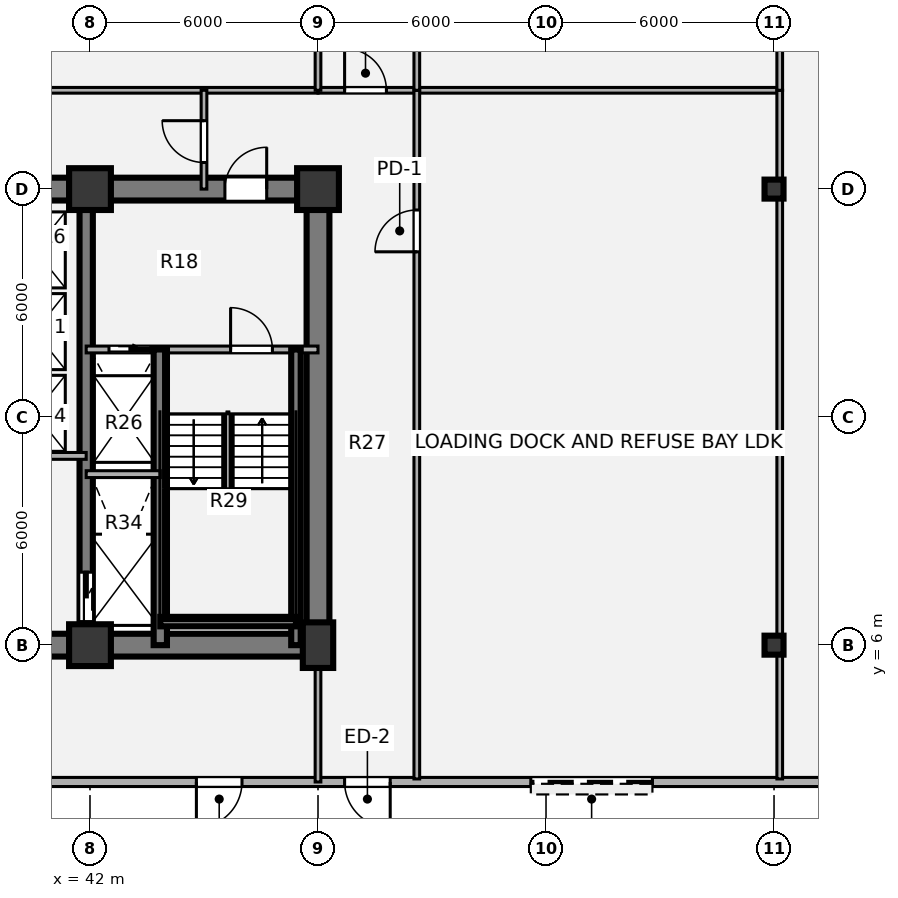
"""IFC4 building model, lengths in metres.
Left out: names, types, materials, properties, quantities, classifications, styles, units other than length and angle.
Written with IfcOpenShell. Run it as: python <this file> out.ifc"""

import sys

from ifc_helpers import new_model, si_unit, direction, frame, frame_2d, origin, origin_2d, place, context, subcontext, project, spatial, rectangle, i_section, extrude, source, transform, mapped, element, fill, save


model = new_model("IFC4")
c1 = context("Model", 3, precision=1e-05, world=origin(), true_north=direction((0.0, 1.0)))
c2 = subcontext(c1, "Body", "Model", "MODEL_VIEW")
j1 = project(units=[si_unit("LENGTHUNIT", "METRE"), si_unit("PLANEANGLEUNIT", "RADIAN")], contexts=[c1])
p1 = place(None, origin())
s1 = spatial("IfcSite", under=j1, at=p1, CompositionType="ELEMENT")
p2 = place(p1, origin())
s2 = spatial("IfcBuilding", under=s1, at=p2, CompositionType="ELEMENT")
p3 = place(p2, origin())
s3 = spatial("IfcBuildingStorey", under=s2, at=p3, CompositionType="ELEMENT", Elevation=0.0)
m1 = source(origin(), c2, "Body", "SweptSolid", [
    extrude(rectangle(XDim=1.1, YDim=1.1, at=origin_2d()), origin(), (0.0, 0.0, 1.0), 5.4),
])
p4 = place(p3, frame((42.0, 6.0, 0.0), z_axis=(0.0, 0.0, 1.0), x_axis=(1.0, 0.0, 0.0)))
e1 = element("IfcColumn", 1, at=p4, inside=s3, PredefinedType="COLUMN", context=c2, shape_type="MappedRepresentation", body=[
    mapped(m1, transform((0.0, 0.0, 0.0), x_axis=(1.0, 0.0, 0.0), y_axis=(0.0, 1.0, 0.0), z_axis=(0.0, 0.0, 1.0), scale=1.0)),
])
m2 = source(origin(), c2, "Body", "SweptSolid", [
    extrude(rectangle(XDim=0.8, YDim=1.2, at=origin_2d()), origin(), (0.0, 0.0, 1.0), 5.4),
])
p5 = place(p3, frame((48.0, 6.0, 0.0), z_axis=(0.0, 0.0, 1.0), x_axis=(1.0, 0.0, 0.0)))
e2 = element("IfcColumn", 2, at=p5, inside=s3, PredefinedType="COLUMN", context=c2, shape_type="MappedRepresentation", body=[
    mapped(m2, transform((0.0, 0.0, 0.0), x_axis=(1.0, 0.0, 0.0), y_axis=(0.0, 1.0, 0.0), z_axis=(0.0, 0.0, 1.0), scale=1.0)),
])
for number, where, z_axis, x_axis in (
    (3, (42.0, 18.0, 0.0), (0.0, 0.0, 1.0), (1.0, 0.0, 0.0)),
    (4, (48.0, 18.0, 0.0), (0.0, 0.0, 1.0), (1.0, 0.0, 0.0)),
):
    element("IfcColumn", number, at=place(p3, frame(where, z_axis=z_axis, x_axis=x_axis)), inside=s3, PredefinedType="COLUMN", context=c2, shape_type="MappedRepresentation", body=[
        mapped(m1, transform((0.0, 0.0, 0.0), x_axis=(1.0, 0.0, 0.0), y_axis=(0.0, 1.0, 0.0), z_axis=(0.0, 0.0, 1.0), scale=1.0)),
    ])
p6 = place(p3, frame((48.3, 6.0, 0.0), z_axis=(0.0, 0.0, 1.0), x_axis=(-1.0, 0.0, 0.0)))
e5 = element("IfcWall", 5, at=p6, inside=s3, PredefinedType="SHEAR", context=c2, shape_type="SweptSolid", body=[
    extrude(rectangle(XDim=24.6, YDim=0.6, at=frame_2d((12.3, 0.0))), origin(), (0.0, 0.0, 1.0), 5.4),
])
p7 = place(p3, frame((48.0, 18.0, 0.0), z_axis=(0.0, 0.0, 1.0), x_axis=(0.0, -1.0, 0.0)))
e6 = element("IfcWall", 6, at=p7, inside=s3, PredefinedType="SHEAR", context=c2, shape_type="SweptSolid", body=[
    extrude(rectangle(XDim=12.0, YDim=0.6, at=frame_2d((6.0, 0.0))), origin(), (0.0, 0.0, 1.0), 5.4),
])
p8 = place(p3, frame((38.8, 18.0, 0.0), z_axis=(0.0, 0.0, 1.0), x_axis=(1.0, 0.0, 0.0)))
e7 = element("IfcWall", 7, at=p8, inside=s3, PredefinedType="SHEAR", context=c2, shape_type="SweptSolid", body=[
    extrude(rectangle(XDim=9.5, YDim=0.6, at=frame_2d((4.75, 0.0))), origin(), (0.0, 0.0, 1.0), 5.4),
])
p9 = place(p8, frame((6.75, 0.0, 0.0)))
e8 = element("IfcOpeningElement", 8, at=p9, cuts=e7, PredefinedType="OPENING", context=c2, shape_type="SweptSolid", body=[
    extrude(rectangle(XDim=1.1, YDim=2.1, at=origin_2d()), frame((0.55, 0.31, 1.05), z_axis=(0.0, -1.0, 0.0), x_axis=(1.0, 0.0, 0.0)), (0.0, 0.0, 1.0), 0.62),
])
p10 = place(p3, frame((41.9, 18.0, 0.0), z_axis=(0.0, 0.0, 1.0), x_axis=(0.0, -1.0, 0.0)))
e9 = element("IfcWall", 9, at=p10, inside=s3, PredefinedType="SHEAR", context=c2, shape_type="SweptSolid", body=[
    extrude(rectangle(XDim=12.0, YDim=0.35, at=frame_2d((6.0, 0.0))), origin(), (0.0, 0.0, 1.0), 5.4),
])
p11 = place(p10, frame((10.08, 0.0, 0.0)))
e10 = element("IfcOpeningElement", 10, at=p11, cuts=e9, PredefinedType="OPENING", context=c2, shape_type="SweptSolid", body=[
    extrude(rectangle(XDim=1.3, YDim=2.1, at=origin_2d()), frame((0.65, 0.185, 1.05), z_axis=(0.0, -1.0, 0.0), x_axis=(1.0, 0.0, 0.0)), (0.0, 0.0, 1.0), 0.37),
])
m3 = source(origin(), c2, "Body", "SweptSolid", [
    extrude(i_section(OverallWidth=0.5, OverallDepth=0.5, WebThickness=0.028, FlangeThickness=0.045, at=origin_2d()), origin(), (0.0, 0.0, 1.0), 5.4),
])
for number, where, z_axis, x_axis in (
    (11, (60.0, 6.0, 0.0), (0.0, 0.0, 1.0), (1.0, 0.0, 0.0)),
    (12, (60.0, 18.0, 0.0), (0.0, 0.0, 1.0), (1.0, 0.0, 0.0)),
):
    element("IfcColumn", number, at=place(p3, frame(where, z_axis=z_axis, x_axis=x_axis)), inside=s3, PredefinedType="COLUMN", context=c2, shape_type="MappedRepresentation", body=[
        mapped(m3, transform((0.0, 0.0, 0.0), x_axis=(1.0, 0.0, 0.0), y_axis=(0.0, 1.0, 0.0), z_axis=(0.0, 0.0, 1.0), scale=1.0)),
    ])
p12 = place(p3, frame((61.8, 2.4, 0.0), z_axis=(0.0, 0.0, 1.0), x_axis=(-1.0, 0.0, 0.0)))
e13 = element("IfcWall", 13, at=p12, inside=s3, PredefinedType="SOLIDWALL", context=c2, shape_type="SweptSolid", body=[
    extrude(rectangle(XDim=51.6, YDim=0.24, at=frame_2d((25.8, 0.0))), origin(), (0.0, 0.0, 1.0), 5.12),
])
p13 = place(p12, frame((5.0, 0.0, 0.0)))
e14 = element("IfcOpeningElement", 14, at=p13, cuts=e13, PredefinedType="OPENING", context=c2, shape_type="SweptSolid", body=[
    extrude(rectangle(XDim=3.2, YDim=3.4, at=origin_2d()), frame((1.6, 0.13, 1.7), z_axis=(0.0, -1.0, 0.0), x_axis=(1.0, 0.0, 0.0)), (0.0, 0.0, 1.0), 0.26),
])
p14 = place(p12, frame((11.9, 0.0, 0.0)))
e15 = element("IfcOpeningElement", 15, at=p14, cuts=e13, PredefinedType="OPENING", context=c2, shape_type="SweptSolid", body=[
    extrude(rectangle(XDim=1.2, YDim=2.2, at=origin_2d()), frame((0.6, 0.13, 1.1), z_axis=(0.0, -1.0, 0.0), x_axis=(1.0, 0.0, 0.0)), (0.0, 0.0, 1.0), 0.26),
])
p15 = place(p12, frame((15.8, 0.0, 0.0)))
e16 = element("IfcOpeningElement", 16, at=p15, cuts=e13, PredefinedType="OPENING", context=c2, shape_type="SweptSolid", body=[
    extrude(rectangle(XDim=1.2, YDim=2.2, at=origin_2d()), frame((0.6, 0.13, 1.1), z_axis=(0.0, -1.0, 0.0), x_axis=(1.0, 0.0, 0.0)), (0.0, 0.0, 1.0), 0.26),
])
p16 = place(p12, frame((24.9, 0.0, 0.0)))
e17 = element("IfcOpeningElement", 17, at=p16, cuts=e13, PredefinedType="OPENING", context=c2, shape_type="SweptSolid", body=[
    extrude(rectangle(XDim=1.8, YDim=2.3, at=origin_2d()), frame((0.9, 0.13, 1.15), z_axis=(0.0, -1.0, 0.0), x_axis=(1.0, 0.0, 0.0)), (0.0, 0.0, 1.0), 0.26),
])
p17 = place(p12, frame((39.8, 0.0, 0.0)))
e18 = element("IfcOpeningElement", 18, at=p17, cuts=e13, PredefinedType="OPENING", context=c2, shape_type="SweptSolid", body=[
    extrude(rectangle(XDim=1.2, YDim=2.2, at=origin_2d()), frame((0.6, 0.13, 1.1), z_axis=(0.0, -1.0, 0.0), x_axis=(1.0, 0.0, 0.0)), (0.0, 0.0, 1.0), 0.26),
])
p18 = place(p12, frame((42.8, 0.0, 0.0)))
e19 = element("IfcOpeningElement", 19, at=p18, cuts=e13, PredefinedType="OPENING", context=c2, shape_type="SweptSolid", body=[
    extrude(rectangle(XDim=6.0, YDim=3.6, at=origin_2d()), frame((3.0, 0.13, 1.8), z_axis=(0.0, -1.0, 0.0), x_axis=(1.0, 0.0, 0.0)), (0.0, 0.0, 1.0), 0.26),
])
p19 = place(p12, frame((28.4, 0.0, 1.1)))
e20 = element("IfcOpeningElement", 20, at=p19, cuts=e13, PredefinedType="OPENING", context=c2, shape_type="SweptSolid", body=[
    extrude(rectangle(XDim=1.8, YDim=1.5, at=origin_2d()), frame((0.9, 0.13, 0.75), z_axis=(0.0, -1.0, 0.0), x_axis=(1.0, 0.0, 0.0)), (0.0, 0.0, 1.0), 0.26),
])
p20 = place(p3, frame((39.35, 10.98, 0.0), z_axis=(0.0, 0.0, 1.0), x_axis=(1.0, 0.0, 0.0)))
e21 = element("IfcWall", 21, at=p20, inside=s3, PredefinedType="PARTITIONING", context=c2, shape_type="SweptSolid", body=[
    extrude(rectangle(XDim=2.55, YDim=0.18, at=frame_2d((1.275, 0.0))), origin(), (0.0, 0.0, 1.0), 5.09),
])
p21 = place(p3, frame((41.9, 13.78, 0.0), z_axis=(0.0, 0.0, 1.0), x_axis=(1.0, 0.0, 0.0)))
e22 = element("IfcWall", 22, at=p21, inside=s3, PredefinedType="PARTITIONING", context=c2, shape_type="SweptSolid", body=[
    extrude(rectangle(XDim=6.1, YDim=0.18, at=frame_2d((3.05, 0.0))), origin(), (0.0, 0.0, 1.0), 2.229),
])
p22 = place(p21, frame((0.6, 0.0, 0.0)))
e23 = element("IfcOpeningElement", 23, at=p22, cuts=e22, PredefinedType="OPENING", context=c2, shape_type="SweptSolid", body=[
    extrude(rectangle(XDim=1.1, YDim=2.1, at=origin_2d()), frame((0.55, 0.1, 1.05), z_axis=(0.0, -1.0, 0.0), x_axis=(1.0, 0.0, 0.0)), (0.0, 0.0, 1.0), 0.2),
])
p23 = place(p21, frame((3.8, 0.0, 0.0)))
e24 = element("IfcOpeningElement", 24, at=p23, cuts=e22, PredefinedType="OPENING", context=c2, shape_type="SweptSolid", body=[
    extrude(rectangle(XDim=1.1, YDim=2.1, at=origin_2d()), frame((0.55, 0.1, 1.05), z_axis=(0.0, -1.0, 0.0), x_axis=(1.0, 0.0, 0.0)), (0.0, 0.0, 1.0), 0.2),
])
p24 = place(p3, frame((43.85, 6.0, 0.0), z_axis=(0.0, 0.0, 1.0), x_axis=(0.0, 1.0, 0.0)))
e25 = element("IfcWall", 25, at=p24, inside=s3, PredefinedType="SHEAR", context=c2, shape_type="SweptSolid", body=[
    extrude(rectangle(XDim=7.78, YDim=0.35, at=frame_2d((3.89, 0.0))), origin(), (0.0, 0.0, 1.0), 5.44),
])
p25 = place(p3, frame((47.42, 6.0, 0.0), z_axis=(0.0, 0.0, 1.0), x_axis=(0.0, 1.0, 0.0)))
e26 = element("IfcWall", 26, at=p25, inside=s3, PredefinedType="SHEAR", context=c2, shape_type="SweptSolid", body=[
    extrude(rectangle(XDim=7.78, YDim=0.25, at=frame_2d((3.89, 0.0))), origin(), (0.0, 0.0, 1.0), 5.44),
])
p26 = place(p3, frame((43.85, 6.62, 0.0), z_axis=(0.0, 0.0, 1.0), x_axis=(1.0, 0.0, 0.0)))
e27 = element("IfcWall", 27, at=p26, inside=s3, PredefinedType="SHEAR", context=c2, shape_type="SweptSolid", body=[
    extrude(rectangle(XDim=3.57, YDim=0.25, at=frame_2d((1.785, 0.0))), origin(), (0.0, 0.0, 1.0), 5.44),
])
p27 = place(p3, frame((41.9, 10.5, 0.0), z_axis=(0.0, 0.0, 1.0), x_axis=(1.0, 0.0, 0.0)))
e28 = element("IfcWall", 28, at=p27, inside=s3, PredefinedType="PARTITIONING", context=c2, shape_type="SweptSolid", body=[
    extrude(rectangle(XDim=1.95, YDim=0.18, at=frame_2d((0.975, 0.0))), origin(), (0.0, 0.0, 1.0), 5.09),
])
p28 = place(p3, frame((37.4, 20.6, 0.0), z_axis=(0.0, 0.0, 1.0), x_axis=(1.0, 0.0, 0.0)))
e29 = element("IfcWall", 29, at=p28, inside=s3, PredefinedType="PARTITIONING", context=c2, shape_type="SweptSolid", body=[
    extrude(rectangle(XDim=10.6, YDim=0.15, at=frame_2d((5.3, 0.0))), origin(), (0.0, 0.0, 1.0), 5.09),
])
p29 = place(p3, frame((48.0, 20.6, 0.0), z_axis=(0.0, 0.0, 1.0), x_axis=(1.0, 0.0, 0.0)))
e30 = element("IfcWall", 30, at=p29, inside=s3, PredefinedType="PARTITIONING", context=c2, shape_type="SweptSolid", body=[
    extrude(rectangle(XDim=2.6, YDim=0.15, at=frame_2d((1.3, 0.0))), origin(), (0.0, 0.0, 1.0), 5.09),
])
p30 = place(p29, frame((0.7, 0.0, 0.0)))
e31 = element("IfcOpeningElement", 31, at=p30, cuts=e30, PredefinedType="OPENING", context=c2, shape_type="SweptSolid", body=[
    extrude(rectangle(XDim=1.1, YDim=2.1, at=origin_2d()), frame((0.55, 0.085, 1.05), z_axis=(0.0, -1.0, 0.0), x_axis=(1.0, 0.0, 0.0)), (0.0, 0.0, 1.0), 0.17),
])
p31 = place(p3, frame((50.6, 20.6, 0.0), z_axis=(0.0, 0.0, 1.0), x_axis=(1.0, 0.0, 0.0)))
e32 = element("IfcWall", 32, at=p31, inside=s3, PredefinedType="PARTITIONING", context=c2, shape_type="SweptSolid", body=[
    extrude(rectangle(XDim=9.55, YDim=0.15, at=frame_2d((4.775, 0.0))), origin(), (0.0, 0.0, 1.0), 5.09),
])
p32 = place(p3, frame((45.0, 18.0, 0.0), z_axis=(0.0, 0.0, 1.0), x_axis=(0.0, 1.0, 0.0)))
e33 = element("IfcWall", 33, at=p32, inside=s3, PredefinedType="PARTITIONING", context=c2, shape_type="SweptSolid", body=[
    extrude(rectangle(XDim=2.6, YDim=0.15, at=frame_2d((1.3, 0.0))), origin(), (0.0, 0.0, 1.0), 4.746),
])
p33 = place(p32, frame((0.7, 0.0, 0.0)))
e34 = element("IfcOpeningElement", 34, at=p33, cuts=e33, PredefinedType="OPENING", context=c2, shape_type="SweptSolid", body=[
    extrude(rectangle(XDim=1.1, YDim=2.1, at=origin_2d()), frame((0.55, 0.085, 1.05), z_axis=(0.0, -1.0, 0.0), x_axis=(1.0, 0.0, 0.0)), (0.0, 0.0, 1.0), 0.17),
])
p34 = place(p3, frame((48.0, 2.4, 0.0), z_axis=(0.0, 0.0, 1.0), x_axis=(0.0, 1.0, 0.0)))
e35 = element("IfcWall", 35, at=p34, inside=s3, PredefinedType="PARTITIONING", context=c2, shape_type="SweptSolid", body=[
    extrude(rectangle(XDim=3.6, YDim=0.15, at=frame_2d((1.8, 0.0))), origin(), (0.0, 0.0, 1.0), 5.09),
])
p35 = place(p3, frame((48.0, 20.6, 0.0), z_axis=(0.0, 0.0, 1.0), x_axis=(0.0, 1.0, 0.0)))
e36 = element("IfcWall", 36, at=p35, inside=s3, PredefinedType="PARTITIONING", context=c2, shape_type="SweptSolid", body=[
    extrude(rectangle(XDim=13.85, YDim=0.15, at=frame_2d((6.925, 0.0))), origin(), (0.0, 0.0, 1.0), 4.305),
])
p36 = place(p3, frame((50.6, 2.48, 0.0), z_axis=(0.0, 0.0, 1.0), x_axis=(0.0, 1.0, 0.0)))
e37 = element("IfcWall", 37, at=p36, inside=s3, PredefinedType="PARTITIONING", context=c2, shape_type="SweptSolid", body=[
    extrude(rectangle(XDim=18.12, YDim=0.15, at=frame_2d((9.06, 0.0))), origin(), (0.0, 0.0, 1.0), 4.746),
])
p37 = place(p36, frame((13.87, 0.0, 0.0)))
e38 = element("IfcOpeningElement", 38, at=p37, cuts=e37, PredefinedType="OPENING", context=c2, shape_type="SweptSolid", body=[
    extrude(rectangle(XDim=1.1, YDim=2.1, at=origin_2d()), frame((0.55, 0.085, 1.05), z_axis=(0.0, -1.0, 0.0), x_axis=(1.0, 0.0, 0.0)), (0.0, 0.0, 1.0), 0.17),
])
p38 = place(p3, frame((50.6, 20.6, 0.0), z_axis=(0.0, 0.0, 1.0), x_axis=(0.0, 1.0, 0.0)))
e39 = element("IfcWall", 39, at=p38, inside=s3, PredefinedType="PARTITIONING", context=c2, shape_type="SweptSolid", body=[
    extrude(rectangle(XDim=4.8, YDim=0.15, at=frame_2d((2.4, 0.0))), origin(), (0.0, 0.0, 1.0), 4.746),
])
p39 = place(p38, frame((1.94, 0.0, 0.0)))
e40 = element("IfcOpeningElement", 40, at=p39, cuts=e39, PredefinedType="OPENING", context=c2, shape_type="SweptSolid", body=[
    extrude(rectangle(XDim=0.86, YDim=2.1, at=origin_2d()), frame((0.43, 0.085, 1.05), z_axis=(0.0, -1.0, 0.0), x_axis=(1.0, 0.0, 0.0)), (0.0, 0.0, 1.0), 0.17),
])
p40 = place(p3, frame((60.15, 2.48, 0.0), z_axis=(0.0, 0.0, 1.0), x_axis=(0.0, 1.0, 0.0)))
e41 = element("IfcWall", 41, at=p40, inside=s3, PredefinedType="PARTITIONING", context=c2, shape_type="SweptSolid", body=[
    extrude(rectangle(XDim=18.12, YDim=0.15, at=frame_2d((9.06, 0.0))), origin(), (0.0, 0.0, 1.0), 4.305),
])
p41 = place(p3, frame((60.15, 20.6, 0.0), z_axis=(0.0, 0.0, 1.0), x_axis=(0.0, 1.0, 0.0)))
e42 = element("IfcWall", 42, at=p41, inside=s3, PredefinedType="PARTITIONING", context=c2, shape_type="SweptSolid", body=[
    extrude(rectangle(XDim=4.8, YDim=0.15, at=frame_2d((2.4, 0.0))), origin(), (0.0, 0.0, 1.0), 4.305),
])
m4 = source(origin(), c2, "Body", "SweptSolid", [
    extrude(rectangle(XDim=3.2, YDim=3.4, at=origin_2d()), frame((1.6, 0.025, 1.7), z_axis=(0.0, -1.0, 0.0), x_axis=(1.0, 0.0, 0.0)), (0.0, 0.0, 1.0), 0.05),
])
p42 = place(p13, origin())
e43 = element("IfcDoor", 43, at=p42, inside=s3, OperationType="ROLLINGUP", PredefinedType="GATE", context=c2, shape_type="MappedRepresentation", body=[
    mapped(m4, transform((0.0, 0.0, 0.0), x_axis=(1.0, 0.0, 0.0), y_axis=(0.0, 1.0, 0.0), z_axis=(0.0, 0.0, 1.0), scale=1.0)),
])
fill(e14, e43)
m5 = source(origin(), c2, "Body", "SweptSolid", [
    extrude(rectangle(XDim=1.2, YDim=2.2, at=origin_2d()), frame((0.6, 0.025, 1.1), z_axis=(0.0, -1.0, 0.0), x_axis=(1.0, 0.0, 0.0)), (0.0, 0.0, 1.0), 0.05),
])
p43 = place(p14, origin())
e44 = element("IfcDoor", 44, at=p43, inside=s3, OperationType="SINGLE_SWING_LEFT", PredefinedType="DOOR", context=c2, shape_type="MappedRepresentation", body=[
    mapped(m5, transform((0.0, 0.0, 0.0), x_axis=(1.0, 0.0, 0.0), y_axis=(0.0, 1.0, 0.0), z_axis=(0.0, 0.0, 1.0), scale=1.0)),
])
fill(e15, e44)
p44 = place(p15, origin())
e45 = element("IfcDoor", 45, at=p44, inside=s3, OperationType="SINGLE_SWING_RIGHT", PredefinedType="DOOR", context=c2, shape_type="MappedRepresentation", body=[
    mapped(m5, transform((0.0, 0.0, 0.0), x_axis=(1.0, 0.0, 0.0), y_axis=(0.0, 1.0, 0.0), z_axis=(0.0, 0.0, 1.0), scale=1.0)),
])
fill(e16, e45)
m6 = source(origin(), c2, "Body", "SweptSolid", [
    extrude(rectangle(XDim=1.1, YDim=2.1, at=origin_2d()), frame((0.55, 0.025, 1.05), z_axis=(0.0, -1.0, 0.0), x_axis=(1.0, 0.0, 0.0)), (0.0, 0.0, 1.0), 0.05),
])
p45 = place(p22, origin())
e46 = element("IfcDoor", 46, at=p45, inside=s3, OperationType="SLIDING_TO_RIGHT", PredefinedType="DOOR", context=c2, shape_type="MappedRepresentation", body=[
    mapped(m6, transform((0.0, 0.0, 0.0), x_axis=(1.0, 0.0, 0.0), y_axis=(0.0, 1.0, 0.0), z_axis=(0.0, 0.0, 1.0), scale=1.0)),
])
fill(e23, e46)
m7 = source(origin(), c2, "Body", "SweptSolid", [
    extrude(rectangle(XDim=1.1, YDim=2.1, at=origin_2d()), frame((0.55, 0.025, 1.05), z_axis=(0.0, -1.0, 0.0), x_axis=(1.0, 0.0, 0.0)), (0.0, 0.0, 1.0), 0.05),
])
p46 = place(p23, origin())
e47 = element("IfcDoor", 47, at=p46, inside=s3, OperationType="SINGLE_SWING_LEFT", PredefinedType="DOOR", context=c2, shape_type="MappedRepresentation", body=[
    mapped(m7, transform((0.0, 0.0, 0.0), x_axis=(1.0, 0.0, 0.0), y_axis=(0.0, 1.0, 0.0), z_axis=(0.0, 0.0, 1.0), scale=1.0)),
])
fill(e24, e47)
m8 = source(origin(), c2, "Body", "SweptSolid", [
    extrude(rectangle(XDim=1.3, YDim=2.1, at=origin_2d()), frame((0.65, 0.025, 1.05), z_axis=(0.0, -1.0, 0.0), x_axis=(1.0, 0.0, 0.0)), (0.0, 0.0, 1.0), 0.05),
])
p47 = place(p11, origin())
e48 = element("IfcDoor", 48, at=p47, inside=s3, OperationType="SLIDING_TO_LEFT", PredefinedType="DOOR", context=c2, shape_type="MappedRepresentation", body=[
    mapped(m8, transform((0.0, 0.0, 0.0), x_axis=(1.0, 0.0, 0.0), y_axis=(0.0, 1.0, 0.0), z_axis=(0.0, 0.0, 1.0), scale=1.0)),
])
fill(e10, e48)
m9 = source(origin(), c2, "Body", "SweptSolid", [
    extrude(rectangle(XDim=1.1, YDim=2.1, at=origin_2d()), frame((0.55, 0.025, 1.05), z_axis=(0.0, -1.0, 0.0), x_axis=(1.0, 0.0, 0.0)), (0.0, 0.0, 1.0), 0.05),
])
p48 = place(p9, origin())
e49 = element("IfcDoor", 49, at=p48, inside=s3, OperationType="SINGLE_SWING_RIGHT", PredefinedType="DOOR", context=c2, shape_type="MappedRepresentation", body=[
    mapped(m9, transform((0.0, 0.0, 0.0), x_axis=(1.0, 0.0, 0.0), y_axis=(0.0, 1.0, 0.0), z_axis=(0.0, 0.0, 1.0), scale=1.0)),
])
fill(e8, e49)
p49 = place(p30, origin())
e50 = element("IfcDoor", 50, at=p49, inside=s3, OperationType="SINGLE_SWING_LEFT", PredefinedType="DOOR", context=c2, shape_type="MappedRepresentation", body=[
    mapped(m7, transform((0.0, 0.0, 0.0), x_axis=(1.0, 0.0, 0.0), y_axis=(0.0, 1.0, 0.0), z_axis=(0.0, 0.0, 1.0), scale=1.0)),
])
fill(e31, e50)
p50 = place(p33, origin())
e51 = element("IfcDoor", 51, at=p50, inside=s3, OperationType="SINGLE_SWING_RIGHT", PredefinedType="DOOR", context=c2, shape_type="MappedRepresentation", body=[
    mapped(m7, transform((0.0, 0.0, 0.0), x_axis=(1.0, 0.0, 0.0), y_axis=(0.0, 1.0, 0.0), z_axis=(0.0, 0.0, 1.0), scale=1.0)),
])
fill(e34, e51)
m10 = source(origin(), c2, "Body", "SweptSolid", [
    extrude(rectangle(XDim=1.1, YDim=2.1, at=origin_2d()), frame((0.55, 0.025, 1.05), z_axis=(0.0, -1.0, 0.0), x_axis=(1.0, 0.0, 0.0)), (0.0, 0.0, 1.0), 0.05),
])
p51 = place(p37, origin())
e52 = element("IfcDoor", 52, at=p51, inside=s3, OperationType="SINGLE_SWING_LEFT", PredefinedType="DOOR", context=c2, shape_type="MappedRepresentation", body=[
    mapped(m10, transform((0.0, 0.0, 0.0), x_axis=(1.0, 0.0, 0.0), y_axis=(0.0, 1.0, 0.0), z_axis=(0.0, 0.0, 1.0), scale=1.0)),
])
fill(e38, e52)
save(model, sys.argv[1])
